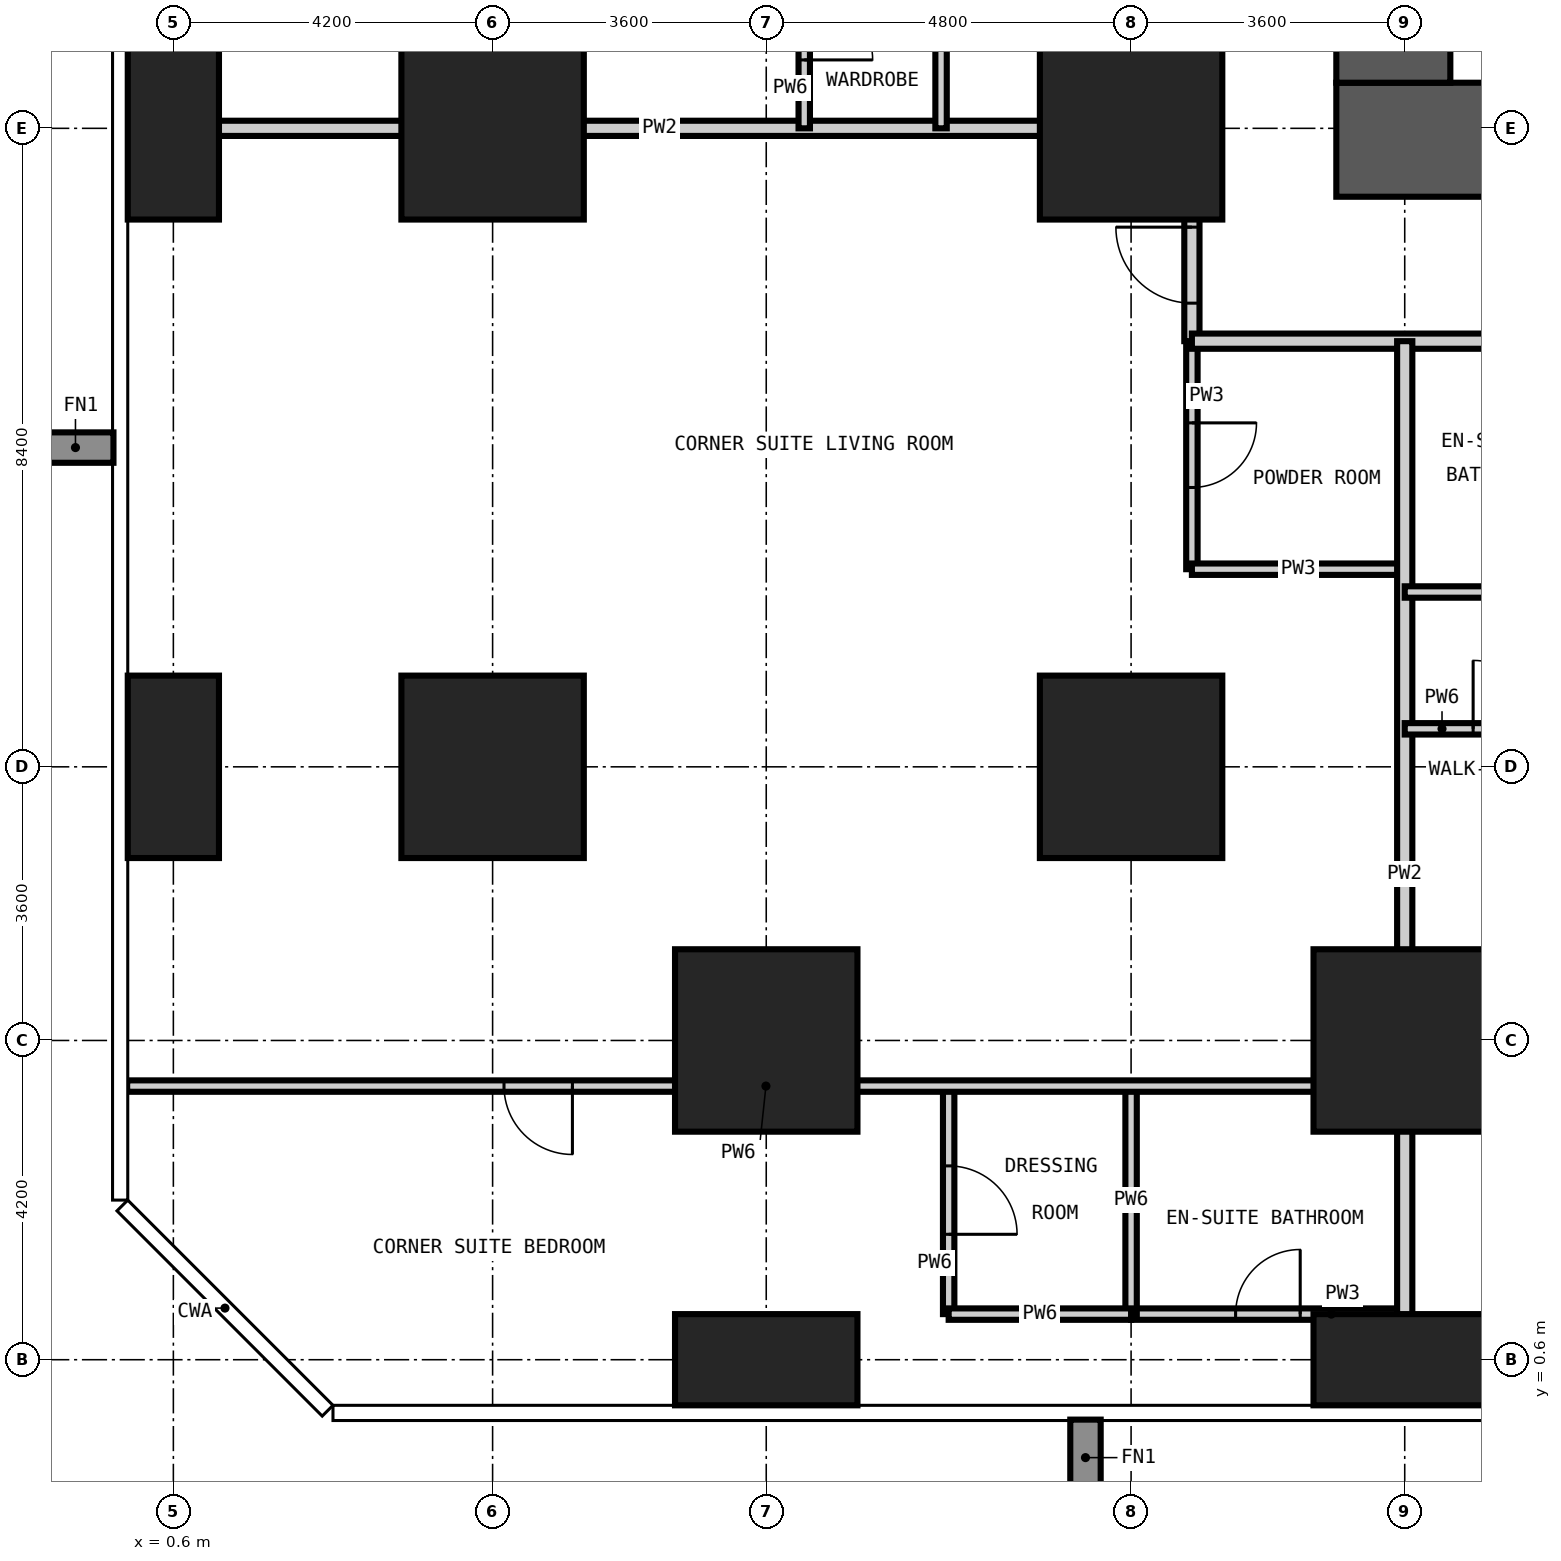
"""IFC4 building model, lengths in metres.
Left out: names, types, materials, properties, quantities, classifications, styles, units other than length and angle.
Written with IfcOpenShell. Run it as: python <this file> out.ifc"""

import sys

from ifc_helpers import new_model, si_unit, direction, frame, frame_2d, origin, origin_2d, place, context, subcontext, project, spatial, rectangle, extrude, element, fill, save


model = new_model("IFC4")
c1 = context("Model", 3, precision=1e-05, world=origin(), true_north=direction((0.0, 1.0)))
c2 = subcontext(c1, "Body", "Model", "MODEL_VIEW")
j1 = project(units=[si_unit("LENGTHUNIT", "METRE"), si_unit("PLANEANGLEUNIT", "RADIAN")], contexts=[c1])
p1 = place(None, origin())
s1 = spatial("IfcSite", under=j1, at=p1, CompositionType="ELEMENT")
p2 = place(p1, origin())
s2 = spatial("IfcBuilding", under=s1, at=p2, CompositionType="ELEMENT")
p3 = place(p2, frame((0.0, 0.0, 81.0)))
s3 = spatial("IfcBuildingStorey", under=s2, at=p3, CompositionType="ELEMENT", Elevation=81.0)
for number, where, z_axis, x_axis in (
    (1, (0.6, 8.4, -0.35), (0.0, 0.0, 1.0), (1.0, 0.0, 0.0)),
    (2, (0.6, 16.8, -0.35), (0.0, 0.0, 1.0), (1.0, 0.0, 0.0)),
):
    element("IfcColumn", number, at=place(p3, frame(where, z_axis=z_axis, x_axis=x_axis)), inside=s3, PredefinedType="COLUMN", context=c2, shape_type="SweptSolid", body=[
        extrude(rectangle(XDim=1.2, YDim=2.4, at=origin_2d()), origin(), (0.0, 0.0, 1.0), 3.6),
    ])
for number, where, z_axis, x_axis in (
    (3, (4.8, 8.4, -0.35), (0.0, 0.0, 1.0), (1.0, 0.0, 0.0)),
    (4, (4.8, 16.8, -0.35), (0.0, 0.0, 1.0), (1.0, 0.0, 0.0)),
):
    element("IfcColumn", number, at=place(p3, frame(where, z_axis=z_axis, x_axis=x_axis)), inside=s3, PredefinedType="COLUMN", context=c2, shape_type="SweptSolid", body=[
        extrude(rectangle(XDim=2.4, YDim=2.4, at=origin_2d()), origin(), (0.0, 0.0, 1.0), 3.6),
    ])
p4 = place(p3, frame((8.4, 0.6, -0.35), z_axis=(0.0, 0.0, 1.0), x_axis=(1.0, 0.0, 0.0)))
e5 = element("IfcColumn", 5, at=p4, inside=s3, PredefinedType="COLUMN", context=c2, shape_type="SweptSolid", body=[
    extrude(rectangle(XDim=2.4, YDim=1.2, at=origin_2d()), origin(), (0.0, 0.0, 1.0), 3.6),
])
for number, where, z_axis, x_axis in (
    (6, (8.4, 4.8, -0.35), (0.0, 0.0, 1.0), (1.0, 0.0, 0.0)),
    (7, (13.2, 8.4, -0.35), (0.0, 0.0, 1.0), (1.0, 0.0, 0.0)),
    (8, (13.2, 16.8, -0.35), (0.0, 0.0, 1.0), (1.0, 0.0, 0.0)),
):
    element("IfcColumn", number, at=place(p3, frame(where, z_axis=z_axis, x_axis=x_axis)), inside=s3, PredefinedType="COLUMN", context=c2, shape_type="SweptSolid", body=[
        extrude(rectangle(XDim=2.4, YDim=2.4, at=origin_2d()), origin(), (0.0, 0.0, 1.0), 3.6),
    ])
p5 = place(p3, frame((16.8, 0.6, -0.35), z_axis=(0.0, 0.0, 1.0), x_axis=(1.0, 0.0, 0.0)))
e9 = element("IfcColumn", 9, at=p5, inside=s3, PredefinedType="COLUMN", context=c2, shape_type="SweptSolid", body=[
    extrude(rectangle(XDim=2.4, YDim=1.2, at=origin_2d()), origin(), (0.0, 0.0, 1.0), 3.6),
])
p6 = place(p3, frame((16.8, 4.8, -0.35), z_axis=(0.0, 0.0, 1.0), x_axis=(1.0, 0.0, 0.0)))
e10 = element("IfcColumn", 10, at=p6, inside=s3, PredefinedType="COLUMN", context=c2, shape_type="SweptSolid", body=[
    extrude(rectangle(XDim=2.4, YDim=2.4, at=origin_2d()), origin(), (0.0, 0.0, 1.0), 3.6),
])
p7 = place(p3, frame((15.9, 16.65, -0.35), z_axis=(0.0, 0.0, 1.0), x_axis=(1.0, 0.0, 0.0)))
e11 = element("IfcWall", 11, at=p7, inside=s3, PredefinedType="SHEAR", context=c2, shape_type="SweptSolid", body=[
    extrude(rectangle(XDim=27.0, YDim=1.5, at=frame_2d((13.5, 0.0))), origin(), (0.0, 0.0, 1.0), 3.6),
])
p8 = place(p7, frame((13.0, 0.0, 0.35)))
e12 = element("IfcOpeningElement", 12, at=p8, cuts=e11, PredefinedType="OPENING", context=c2, shape_type="SweptSolid", body=[
    extrude(rectangle(XDim=1.0, YDim=2.1, at=frame_2d((0.5, 1.05))), frame((0.0, 0.76, 0.0), z_axis=(0.0, -1.0, 0.0), x_axis=(1.0, 0.0, 0.0)), (0.0, 0.0, 1.0), 1.52),
])
p9 = place(p7, frame((19.3, 0.0, 0.35)))
e13 = element("IfcOpeningElement", 13, at=p9, cuts=e11, PredefinedType="OPENING", context=c2, shape_type="SweptSolid", body=[
    extrude(rectangle(XDim=1.0, YDim=2.1, at=frame_2d((0.5, 1.05))), frame((0.0, 0.76, 0.0), z_axis=(0.0, -1.0, 0.0), x_axis=(1.0, 0.0, 0.0)), (0.0, 0.0, 1.0), 1.52),
])
p10 = place(p3, frame((16.65, 41.4, -0.35), z_axis=(0.0, 0.0, 1.0), x_axis=(0.0, -1.0, 0.0)))
e14 = element("IfcWall", 14, at=p10, inside=s3, PredefinedType="SHEAR", context=c2, shape_type="SweptSolid", body=[
    extrude(rectangle(XDim=24.0, YDim=1.5, at=frame_2d((12.0, 0.0))), origin(), (0.0, 0.0, 1.0), 3.6),
])
p11 = place(p10, frame((11.1, 0.0, 0.35)))
e15 = element("IfcOpeningElement", 15, at=p11, cuts=e14, PredefinedType="OPENING", context=c2, shape_type="SweptSolid", body=[
    extrude(rectangle(XDim=1.8, YDim=2.2, at=frame_2d((0.9, 1.1))), frame((0.0, 0.76, 0.0), z_axis=(0.0, -1.0, 0.0), x_axis=(1.0, 0.0, 0.0)), (0.0, 0.0, 1.0), 1.52),
])
p12 = place(p10, frame((19.9, 0.0, 0.35)))
e16 = element("IfcOpeningElement", 16, at=p12, cuts=e14, PredefinedType="OPENING", context=c2, shape_type="SweptSolid", body=[
    extrude(rectangle(XDim=1.0, YDim=2.1, at=frame_2d((0.5, 1.05))), frame((0.0, 0.76, 0.0), z_axis=(0.0, -1.0, 0.0), x_axis=(1.0, 0.0, 0.0)), (0.0, 0.0, 1.0), 1.52),
])
p13 = place(p10, frame((5.2, 0.0, 0.35)))
e17 = element("IfcOpeningElement", 17, at=p13, cuts=e14, PredefinedType="OPENING", context=c2, shape_type="SweptSolid", body=[
    extrude(rectangle(XDim=1.0, YDim=2.1, at=frame_2d((0.5, 1.05))), frame((0.0, 0.76, 0.0), z_axis=(0.0, -1.0, 0.0), x_axis=(1.0, 0.0, 0.0)), (0.0, 0.0, 1.0), 1.52),
])
p14 = place(p3, frame((14.0, 11.0, 0.0), z_axis=(0.0, 0.0, 1.0), x_axis=(0.0, 1.0, 0.0)))
e18 = element("IfcWall", 18, at=p14, inside=s3, PredefinedType="PARTITIONING", context=c2, shape_type="SweptSolid", body=[
    extrude(rectangle(XDim=3.0, YDim=0.15, at=frame_2d((1.5, 0.0))), origin(), (0.0, 0.0, 1.0), 3.25),
])
p15 = place(p14, frame((1.075, 0.0, 0.0)))
e19 = element("IfcOpeningElement", 19, at=p15, cuts=e18, PredefinedType="OPENING", context=c2, shape_type="SweptSolid", body=[
    extrude(rectangle(XDim=0.85, YDim=2.1, at=frame_2d((0.425, 1.05))), frame((0.0, 0.085, 0.0), z_axis=(0.0, -1.0, 0.0), x_axis=(1.0, 0.0, 0.0)), (0.0, 0.0, 1.0), 0.17),
])
p16 = place(p3, frame((13.2, 1.2, 0.0), z_axis=(0.0, 0.0, 1.0), x_axis=(1.0, 0.0, 0.0)))
e20 = element("IfcWall", 20, at=p16, inside=s3, PredefinedType="PARTITIONING", context=c2, shape_type="SweptSolid", body=[
    extrude(rectangle(XDim=3.6, YDim=0.15, at=frame_2d((1.8, 0.0))), origin(), (0.0, 0.0, 1.0), 3.25),
])
p17 = place(p16, frame((1.375, 0.0, 0.0)))
e21 = element("IfcOpeningElement", 21, at=p17, cuts=e20, PredefinedType="OPENING", context=c2, shape_type="SweptSolid", body=[
    extrude(rectangle(XDim=0.85, YDim=2.1, at=frame_2d((0.425, 1.05))), frame((0.0, 0.085, 0.0), z_axis=(0.0, -1.0, 0.0), x_axis=(1.0, 0.0, 0.0)), (0.0, 0.0, 1.0), 0.17),
])
p18 = place(p3, frame((14.0, 11.0, 0.0), z_axis=(0.0, 0.0, 1.0), x_axis=(1.0, 0.0, 0.0)))
e22 = element("IfcWall", 22, at=p18, inside=s3, PredefinedType="PARTITIONING", context=c2, shape_type="SweptSolid", body=[
    extrude(rectangle(XDim=2.8, YDim=0.15, at=frame_2d((1.4, 0.0))), origin(), (0.0, 0.0, 1.0), 3.25),
])
p19 = place(p3, frame((14.0, 14.0, 0.0), z_axis=(0.0, 0.0, 1.0), x_axis=(0.0, 1.0, 0.0)))
e23 = element("IfcWall", 23, at=p19, inside=s3, PredefinedType="PARTITIONING", context=c2, shape_type="SweptSolid", body=[
    extrude(rectangle(XDim=32.0, YDim=0.2, at=frame_2d((16.0, 0.0))), origin(), (0.0, 0.0, 1.0), 3.25),
])
p20 = place(p19, frame((5.75, 0.0, 0.0)))
e24 = element("IfcOpeningElement", 24, at=p20, cuts=e23, PredefinedType="OPENING", context=c2, shape_type="SweptSolid", body=[
    extrude(rectangle(XDim=1.0, YDim=2.2, at=frame_2d((0.5, 1.1))), frame((0.0, 0.11, 0.0), z_axis=(0.0, -1.0, 0.0), x_axis=(1.0, 0.0, 0.0)), (0.0, 0.0, 1.0), 0.22),
])
p21 = place(p19, frame((12.5, 0.0, 0.0)))
e25 = element("IfcOpeningElement", 25, at=p21, cuts=e23, PredefinedType="OPENING", context=c2, shape_type="SweptSolid", body=[
    extrude(rectangle(XDim=1.0, YDim=2.2, at=frame_2d((0.5, 1.1))), frame((0.0, 0.11, 0.0), z_axis=(0.0, -1.0, 0.0), x_axis=(1.0, 0.0, 0.0)), (0.0, 0.0, 1.0), 0.22),
])
p22 = place(p19, frame((17.3, 0.0, 0.0)))
e26 = element("IfcOpeningElement", 26, at=p22, cuts=e23, PredefinedType="OPENING", context=c2, shape_type="SweptSolid", body=[
    extrude(rectangle(XDim=1.0, YDim=2.2, at=frame_2d((0.5, 1.1))), frame((0.0, 0.11, 0.0), z_axis=(0.0, -1.0, 0.0), x_axis=(1.0, 0.0, 0.0)), (0.0, 0.0, 1.0), 0.22),
])
p23 = place(p19, frame((24.05, 0.0, 0.0)))
e27 = element("IfcOpeningElement", 27, at=p23, cuts=e23, PredefinedType="OPENING", context=c2, shape_type="SweptSolid", body=[
    extrude(rectangle(XDim=1.0, YDim=2.2, at=frame_2d((0.5, 1.1))), frame((0.0, 0.11, 0.0), z_axis=(0.0, -1.0, 0.0), x_axis=(1.0, 0.0, 0.0)), (0.0, 0.0, 1.0), 0.22),
])
p24 = place(p19, frame((0.5, 0.0, 0.0)))
e28 = element("IfcOpeningElement", 28, at=p24, cuts=e23, PredefinedType="OPENING", context=c2, shape_type="SweptSolid", body=[
    extrude(rectangle(XDim=1.0, YDim=2.2, at=frame_2d((0.5, 1.1))), frame((0.0, 0.11, 0.0), z_axis=(0.0, -1.0, 0.0), x_axis=(1.0, 0.0, 0.0)), (0.0, 0.0, 1.0), 0.22),
])
p25 = place(p19, frame((29.5, 0.0, 0.0)))
e29 = element("IfcOpeningElement", 29, at=p25, cuts=e23, PredefinedType="OPENING", context=c2, shape_type="SweptSolid", body=[
    extrude(rectangle(XDim=1.0, YDim=2.2, at=frame_2d((0.5, 1.1))), frame((0.0, 0.11, 0.0), z_axis=(0.0, -1.0, 0.0), x_axis=(1.0, 0.0, 0.0)), (0.0, 0.0, 1.0), 0.22),
])
p26 = place(p3, frame((45.4, 14.0, 0.0), z_axis=(0.0, 0.0, 1.0), x_axis=(-1.0, 0.0, 0.0)))
e30 = element("IfcWall", 30, at=p26, inside=s3, PredefinedType="PARTITIONING", context=c2, shape_type="SweptSolid", body=[
    extrude(rectangle(XDim=31.4, YDim=0.2, at=frame_2d((15.7, 0.0))), origin(), (0.0, 0.0, 1.0), 3.25),
])
p27 = place(p26, frame((24.65, 0.0, 0.0)))
e31 = element("IfcOpeningElement", 31, at=p27, cuts=e30, PredefinedType="OPENING", context=c2, shape_type="SweptSolid", body=[
    extrude(rectangle(XDim=1.0, YDim=2.2, at=frame_2d((0.5, 1.1))), frame((0.0, 0.11, 0.0), z_axis=(0.0, -1.0, 0.0), x_axis=(1.0, 0.0, 0.0)), (0.0, 0.0, 1.0), 0.22),
])
p28 = place(p26, frame((23.15, 0.0, 0.0)))
e32 = element("IfcOpeningElement", 32, at=p28, cuts=e30, PredefinedType="OPENING", context=c2, shape_type="SweptSolid", body=[
    extrude(rectangle(XDim=1.0, YDim=2.2, at=frame_2d((0.5, 1.1))), frame((0.0, 0.11, 0.0), z_axis=(0.0, -1.0, 0.0), x_axis=(1.0, 0.0, 0.0)), (0.0, 0.0, 1.0), 0.22),
])
p29 = place(p26, frame((13.4, 0.0, 0.0)))
e33 = element("IfcOpeningElement", 33, at=p29, cuts=e30, PredefinedType="OPENING", context=c2, shape_type="SweptSolid", body=[
    extrude(rectangle(XDim=1.0, YDim=2.2, at=frame_2d((0.5, 1.1))), frame((0.0, 0.11, 0.0), z_axis=(0.0, -1.0, 0.0), x_axis=(1.0, 0.0, 0.0)), (0.0, 0.0, 1.0), 0.22),
])
p30 = place(p26, frame((6.35, 0.0, 0.0)))
e34 = element("IfcOpeningElement", 34, at=p30, cuts=e30, PredefinedType="OPENING", context=c2, shape_type="SweptSolid", body=[
    extrude(rectangle(XDim=1.0, YDim=2.2, at=frame_2d((0.5, 1.1))), frame((0.0, 0.11, 0.0), z_axis=(0.0, -1.0, 0.0), x_axis=(1.0, 0.0, 0.0)), (0.0, 0.0, 1.0), 0.22),
])
for number, where, z_axis, x_axis in (
    (35, (16.8, -0.008, 0.0), (0.0, 0.0, 1.0), (0.0, 1.0, 0.0)),
    (36, (-0.008, 16.8, 0.0), (0.0, 0.0, 1.0), (1.0, 0.0, 0.0)),
):
    element("IfcWall", number, at=place(p3, frame(where, z_axis=z_axis, x_axis=x_axis)), inside=s3, PredefinedType="PARTITIONING", context=c2, shape_type="SweptSolid", body=[
        extrude(rectangle(XDim=14.008, YDim=0.2, at=frame_2d((7.004, 0.0))), origin(), (0.0, 0.0, 1.0), 3.25),
    ])
p31 = place(p3, frame((8.9, 16.8, 0.0), z_axis=(0.0, 0.0, 1.0), x_axis=(0.0, 1.0, 0.0)))
e37 = element("IfcWall", 37, at=p31, inside=s3, PredefinedType="PARTITIONING", context=c2, shape_type="SweptSolid", body=[
    extrude(rectangle(XDim=2.7, YDim=0.15, at=frame_2d((1.35, 0.0))), origin(), (0.0, 0.0, 1.0), 3.25),
])
p32 = place(p31, frame((0.9, 0.0, 0.0)))
e38 = element("IfcOpeningElement", 38, at=p32, cuts=e37, PredefinedType="OPENING", context=c2, shape_type="SweptSolid", body=[
    extrude(rectangle(XDim=0.9, YDim=2.1, at=frame_2d((0.45, 1.05))), frame((0.0, 0.085, 0.0), z_axis=(0.0, -1.0, 0.0), x_axis=(1.0, 0.0, 0.0)), (0.0, 0.0, 1.0), 0.17),
])
p33 = place(p3, frame((10.7, 16.8, 0.0), z_axis=(0.0, 0.0, 1.0), x_axis=(0.0, 1.0, 0.0)))
e39 = element("IfcWall", 39, at=p33, inside=s3, PredefinedType="PARTITIONING", context=c2, shape_type="SweptSolid", body=[
    extrude(rectangle(XDim=2.7, YDim=0.15, at=frame_2d((1.35, 0.0))), origin(), (0.0, 0.0, 1.0), 3.25),
])
p34 = place(p3, frame((10.8, 1.2, 0.0), z_axis=(0.0, 0.0, 1.0), x_axis=(0.0, 1.0, 0.0)))
e40 = element("IfcWall", 40, at=p34, inside=s3, PredefinedType="PARTITIONING", context=c2, shape_type="SweptSolid", body=[
    extrude(rectangle(XDim=3.0, YDim=0.15, at=frame_2d((1.5, 0.0))), origin(), (0.0, 0.0, 1.0), 3.25),
])
p35 = place(p34, frame((1.05, 0.0, 0.0)))
e41 = element("IfcOpeningElement", 41, at=p35, cuts=e40, PredefinedType="OPENING", context=c2, shape_type="SweptSolid", body=[
    extrude(rectangle(XDim=0.9, YDim=2.1, at=frame_2d((0.45, 1.05))), frame((0.0, 0.085, 0.0), z_axis=(0.0, -1.0, 0.0), x_axis=(1.0, 0.0, 0.0)), (0.0, 0.0, 1.0), 0.17),
])
p36 = place(p3, frame((13.2, 1.2, 0.0), z_axis=(0.0, 0.0, 1.0), x_axis=(0.0, 1.0, 0.0)))
e42 = element("IfcWall", 42, at=p36, inside=s3, PredefinedType="PARTITIONING", context=c2, shape_type="SweptSolid", body=[
    extrude(rectangle(XDim=3.0, YDim=0.15, at=frame_2d((1.5, 0.0))), origin(), (0.0, 0.0, 1.0), 3.25),
])
p37 = place(p3, frame((10.8, 1.2, 0.0), z_axis=(0.0, 0.0, 1.0), x_axis=(1.0, 0.0, 0.0)))
e43 = element("IfcWall", 43, at=p37, inside=s3, PredefinedType="PARTITIONING", context=c2, shape_type="SweptSolid", body=[
    extrude(rectangle(XDim=2.4, YDim=0.15, at=frame_2d((1.2, 0.0))), origin(), (0.0, 0.0, 1.0), 3.25),
])
p38 = place(p3, frame((-0.008, 4.2, 0.0), z_axis=(0.0, 0.0, 1.0), x_axis=(1.0, 0.0, 0.0)))
e44 = element("IfcWall", 44, at=p38, inside=s3, PredefinedType="PARTITIONING", context=c2, shape_type="SweptSolid", body=[
    extrude(rectangle(XDim=16.808, YDim=0.15, at=frame_2d((8.404, 0.0))), origin(), (0.0, 0.0, 1.0), 3.25),
])
p39 = place(p38, frame((4.958, 0.0, 0.0)))
e45 = element("IfcOpeningElement", 45, at=p39, cuts=e44, PredefinedType="OPENING", context=c2, shape_type="SweptSolid", body=[
    extrude(rectangle(XDim=0.9, YDim=2.1, at=frame_2d((0.45, 1.05))), frame((0.0, 0.085, 0.0), z_axis=(0.0, -1.0, 0.0), x_axis=(1.0, 0.0, 0.0)), (0.0, 0.0, 1.0), 0.17),
])
p40 = place(p3, frame((16.8, 8.9, 0.0), z_axis=(0.0, 0.0, 1.0), x_axis=(1.0, 0.0, 0.0)))
e46 = element("IfcWall", 46, at=p40, inside=s3, PredefinedType="PARTITIONING", context=c2, shape_type="SweptSolid", body=[
    extrude(rectangle(XDim=2.7, YDim=0.15, at=frame_2d((1.35, 0.0))), origin(), (0.0, 0.0, 1.0), 3.25),
])
p41 = place(p40, frame((0.9, 0.0, 0.0)))
e47 = element("IfcOpeningElement", 47, at=p41, cuts=e46, PredefinedType="OPENING", context=c2, shape_type="SweptSolid", body=[
    extrude(rectangle(XDim=0.9, YDim=2.1, at=frame_2d((0.45, 1.05))), frame((0.0, 0.085, 0.0), z_axis=(0.0, -1.0, 0.0), x_axis=(1.0, 0.0, 0.0)), (0.0, 0.0, 1.0), 0.17),
])
p42 = place(p3, frame((16.8, 10.7, 0.0), z_axis=(0.0, 0.0, 1.0), x_axis=(1.0, 0.0, 0.0)))
e48 = element("IfcWall", 48, at=p42, inside=s3, PredefinedType="PARTITIONING", context=c2, shape_type="SweptSolid", body=[
    extrude(rectangle(XDim=2.7, YDim=0.15, at=frame_2d((1.35, 0.0))), origin(), (0.0, 0.0, 1.0), 3.25),
])
p43 = place(p41, origin())
e49 = element("IfcDoor", 49, at=p43, inside=s3, OperationType="SINGLE_SWING_LEFT", PredefinedType="DOOR", context=c2, shape_type="SweptSolid", body=[
    extrude(rectangle(XDim=0.9, YDim=2.1, at=frame_2d((0.45, 1.05))), frame((0.0, 0.025, 0.0), z_axis=(0.0, -1.0, 0.0), x_axis=(1.0, 0.0, 0.0)), (0.0, 0.0, 1.0), 0.05),
])
fill(e47, e49)
p44 = place(p32, frame((0.9, 0.0, 0.0), z_axis=(0.0, 0.0, 1.0), x_axis=(-1.0, 0.0, 0.0)))
e50 = element("IfcDoor", 50, at=p44, inside=s3, OperationType="SINGLE_SWING_RIGHT", PredefinedType="DOOR", context=c2, shape_type="SweptSolid", body=[
    extrude(rectangle(XDim=0.9, YDim=2.1, at=frame_2d((0.45, 1.05))), frame((0.0, 0.025, 0.0), z_axis=(0.0, -1.0, 0.0), x_axis=(1.0, 0.0, 0.0)), (0.0, 0.0, 1.0), 0.05),
])
fill(e38, e50)
p45 = place(p24, origin())
e51 = element("IfcDoor", 51, at=p45, inside=s3, OperationType="SINGLE_SWING_RIGHT", PredefinedType="DOOR", context=c2, shape_type="SweptSolid", body=[
    extrude(rectangle(XDim=1.0, YDim=2.2, at=frame_2d((0.5, 1.1))), frame((0.0, 0.025, 0.0), z_axis=(0.0, -1.0, 0.0), x_axis=(1.0, 0.0, 0.0)), (0.0, 0.0, 1.0), 0.05),
])
fill(e28, e51)
p46 = place(p15, frame((0.85, 0.0, 0.0), z_axis=(0.0, 0.0, 1.0), x_axis=(-1.0, 0.0, 0.0)))
e52 = element("IfcDoor", 52, at=p46, inside=s3, OperationType="SINGLE_SWING_LEFT", PredefinedType="DOOR", context=c2, shape_type="SweptSolid", body=[
    extrude(rectangle(XDim=0.85, YDim=2.1, at=frame_2d((0.425, 1.05))), frame((0.0, 0.025, 0.0), z_axis=(0.0, -1.0, 0.0), x_axis=(1.0, 0.0, 0.0)), (0.0, 0.0, 1.0), 0.05),
])
fill(e19, e52)
p47 = place(p39, frame((0.9, 0.0, 0.0), z_axis=(0.0, 0.0, 1.0), x_axis=(-1.0, 0.0, 0.0)))
e53 = element("IfcDoor", 53, at=p47, inside=s3, OperationType="SINGLE_SWING_LEFT", PredefinedType="DOOR", context=c2, shape_type="SweptSolid", body=[
    extrude(rectangle(XDim=0.9, YDim=2.1, at=frame_2d((0.45, 1.05))), frame((0.0, 0.025, 0.0), z_axis=(0.0, -1.0, 0.0), x_axis=(1.0, 0.0, 0.0)), (0.0, 0.0, 1.0), 0.05),
])
fill(e45, e53)
p48 = place(p17, origin())
e54 = element("IfcDoor", 54, at=p48, inside=s3, OperationType="SINGLE_SWING_RIGHT", PredefinedType="DOOR", context=c2, shape_type="SweptSolid", body=[
    extrude(rectangle(XDim=0.85, YDim=2.1, at=frame_2d((0.425, 1.05))), frame((0.0, 0.025, 0.0), z_axis=(0.0, -1.0, 0.0), x_axis=(1.0, 0.0, 0.0)), (0.0, 0.0, 1.0), 0.05),
])
fill(e21, e54)
p49 = place(p35, frame((0.9, 0.0, 0.0), z_axis=(0.0, 0.0, 1.0), x_axis=(-1.0, 0.0, 0.0)))
e55 = element("IfcDoor", 55, at=p49, inside=s3, OperationType="SINGLE_SWING_RIGHT", PredefinedType="DOOR", context=c2, shape_type="SweptSolid", body=[
    extrude(rectangle(XDim=0.9, YDim=2.1, at=frame_2d((0.45, 1.05))), frame((0.0, 0.025, 0.0), z_axis=(0.0, -1.0, 0.0), x_axis=(1.0, 0.0, 0.0)), (0.0, 0.0, 1.0), 0.05),
])
fill(e41, e55)
save(model, sys.argv[1])
